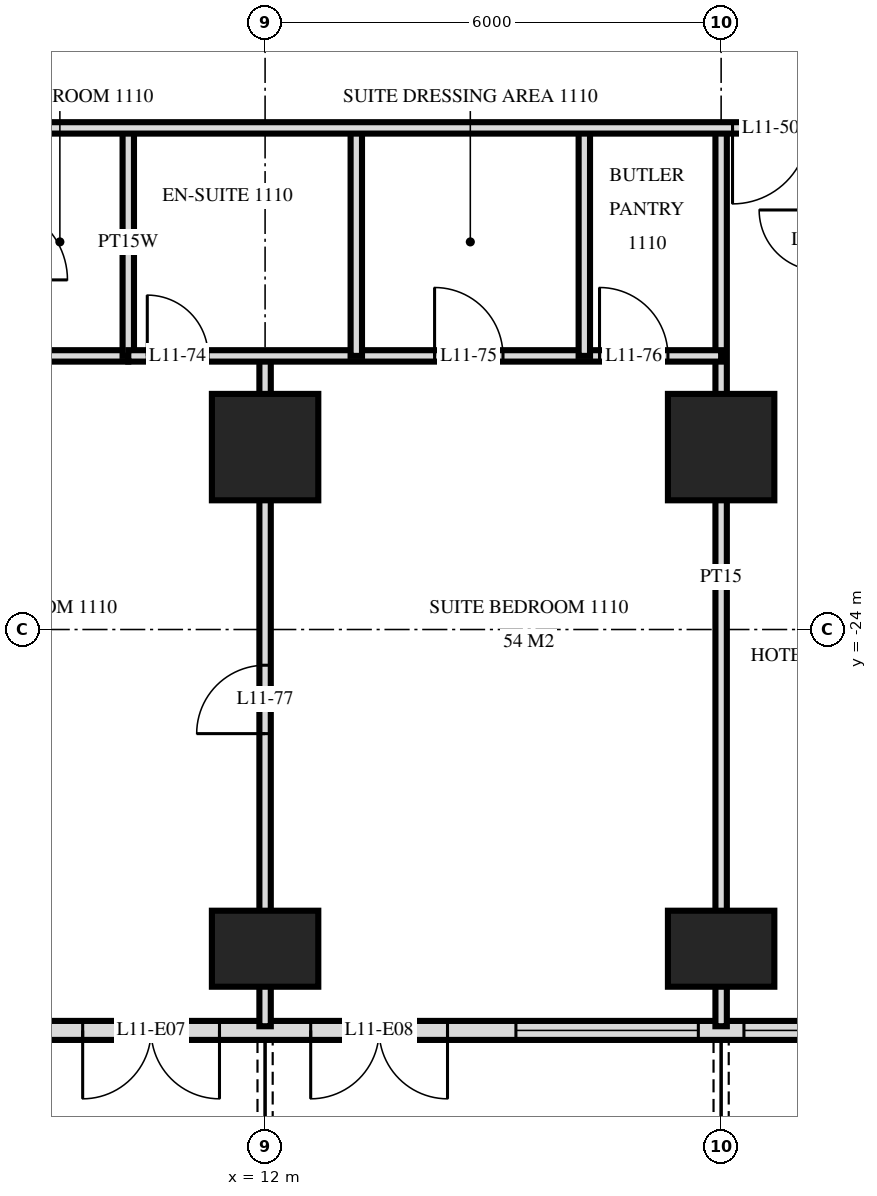
"""IFC4 building model, lengths in metres.
Left out: names, types, materials, properties, quantities, classifications, styles, units other than length and angle.
Written with IfcOpenShell. Run it as: python <this file> out.ifc"""

import sys

from ifc_helpers import new_model, si_unit, direction, frame, frame_2d, origin, origin_2d, place, context, subcontext, project, spatial, rectangle, extrude, element, fill, save


model = new_model("IFC4")
c1 = context("Model", 3, precision=1e-05, world=origin(), true_north=direction((0.0, 1.0)))
c2 = subcontext(c1, "Body", "Model", "MODEL_VIEW")
j1 = project(units=[si_unit("LENGTHUNIT", "METRE"), si_unit("PLANEANGLEUNIT", "RADIAN")], contexts=[c1])
p1 = place(None, origin())
s1 = spatial("IfcSite", under=j1, at=p1, CompositionType="ELEMENT")
p2 = place(p1, origin())
s2 = spatial("IfcBuilding", under=s1, at=p2, CompositionType="ELEMENT")
p3 = place(p2, frame((0.0, 0.0, 49.2)))
s3 = spatial("IfcBuildingStorey", under=s2, at=p3, CompositionType="ELEMENT", Elevation=49.2)
p4 = place(p3, frame((12.0, -28.2, 0.0), z_axis=(0.0, 0.0, 1.0), x_axis=(1.0, 0.0, 0.0)))
e1 = element("IfcColumn", 1, at=p4, inside=s3, PredefinedType="COLUMN", context=c2, shape_type="SweptSolid", body=[
    extrude(rectangle(XDim=1.4, YDim=1.0, at=origin_2d()), origin(), (0.0, 0.0, 1.0), 3.6),
])
p5 = place(p3, frame((12.0, -21.6, 0.0), z_axis=(0.0, 0.0, 1.0), x_axis=(1.0, 0.0, 0.0)))
e2 = element("IfcColumn", 2, at=p5, inside=s3, PredefinedType="COLUMN", context=c2, shape_type="SweptSolid", body=[
    extrude(rectangle(XDim=1.4, YDim=1.4, at=origin_2d()), origin(), (0.0, 0.0, 1.0), 3.6),
])
p6 = place(p3, frame((18.0, -28.2, 0.0), z_axis=(0.0, 0.0, 1.0), x_axis=(1.0, 0.0, 0.0)))
e3 = element("IfcColumn", 3, at=p6, inside=s3, PredefinedType="COLUMN", context=c2, shape_type="SweptSolid", body=[
    extrude(rectangle(XDim=1.4, YDim=1.0, at=origin_2d()), origin(), (0.0, 0.0, 1.0), 3.6),
])
p7 = place(p3, frame((18.0, -21.6, 0.0), z_axis=(0.0, 0.0, 1.0), x_axis=(1.0, 0.0, 0.0)))
e4 = element("IfcColumn", 4, at=p7, inside=s3, PredefinedType="COLUMN", context=c2, shape_type="SweptSolid", body=[
    extrude(rectangle(XDim=1.4, YDim=1.4, at=origin_2d()), origin(), (0.0, 0.0, 1.0), 3.6),
])
p8 = place(p3, frame((-28.775, -29.275, 0.0), z_axis=(0.0, 0.0, 1.0), x_axis=(1.0, 0.0, 0.0)))
e5 = element("IfcWall", 5, at=p8, inside=s3, PredefinedType="SOLIDWALL", context=c2, shape_type="SweptSolid", body=[
    extrude(rectangle(XDim=57.551, YDim=0.25, at=frame_2d((28.775, 0.0))), origin(), (0.0, 0.0, 1.0), 3.32),
])
p9 = place(p8, frame((0.575, 0.0, 0.0)))
e6 = element("IfcOpeningElement", 6, at=p9, cuts=e5, PredefinedType="OPENING", context=c2, shape_type="SweptSolid", body=[
    extrude(rectangle(XDim=1.8, YDim=2.4, at=frame_2d((0.9, 1.2))), frame((0.0, 0.135, 0.0), z_axis=(0.0, -1.0, 0.0), x_axis=(1.0, 0.0, 0.0)), (0.0, 0.0, 1.0), 0.27),
])
p10 = place(p8, frame((5.375, 0.0, 0.0)))
e7 = element("IfcOpeningElement", 7, at=p10, cuts=e5, PredefinedType="OPENING", context=c2, shape_type="SweptSolid", body=[
    extrude(rectangle(XDim=1.8, YDim=2.4, at=frame_2d((0.9, 1.2))), frame((0.0, 0.135, 0.0), z_axis=(0.0, -1.0, 0.0), x_axis=(1.0, 0.0, 0.0)), (0.0, 0.0, 1.0), 0.27),
])
p11 = place(p8, frame((8.075, 0.0, 0.3)))
e8 = element("IfcOpeningElement", 8, at=p11, cuts=e5, PredefinedType="OPENING", context=c2, shape_type="SweptSolid", body=[
    extrude(rectangle(XDim=2.4, YDim=2.1, at=frame_2d((1.2, 1.05))), frame((0.0, 0.135, 0.0), z_axis=(0.0, -1.0, 0.0), x_axis=(1.0, 0.0, 0.0)), (0.0, 0.0, 1.0), 0.27),
])
p12 = place(p8, frame((11.375, 0.0, 0.0)))
e9 = element("IfcOpeningElement", 9, at=p12, cuts=e5, PredefinedType="OPENING", context=c2, shape_type="SweptSolid", body=[
    extrude(rectangle(XDim=1.8, YDim=2.4, at=frame_2d((0.9, 1.2))), frame((0.0, 0.135, 0.0), z_axis=(0.0, -1.0, 0.0), x_axis=(1.0, 0.0, 0.0)), (0.0, 0.0, 1.0), 0.27),
])
p13 = place(p8, frame((14.075, 0.0, 0.3)))
e10 = element("IfcOpeningElement", 10, at=p13, cuts=e5, PredefinedType="OPENING", context=c2, shape_type="SweptSolid", body=[
    extrude(rectangle(XDim=2.4, YDim=2.1, at=frame_2d((1.2, 1.05))), frame((0.0, 0.135, 0.0), z_axis=(0.0, -1.0, 0.0), x_axis=(1.0, 0.0, 0.0)), (0.0, 0.0, 1.0), 0.27),
])
p14 = place(p8, frame((17.375, 0.0, 0.0)))
e11 = element("IfcOpeningElement", 11, at=p14, cuts=e5, PredefinedType="OPENING", context=c2, shape_type="SweptSolid", body=[
    extrude(rectangle(XDim=1.8, YDim=2.4, at=frame_2d((0.9, 1.2))), frame((0.0, 0.135, 0.0), z_axis=(0.0, -1.0, 0.0), x_axis=(1.0, 0.0, 0.0)), (0.0, 0.0, 1.0), 0.27),
])
p15 = place(p8, frame((20.075, 0.0, 0.3)))
e12 = element("IfcOpeningElement", 12, at=p15, cuts=e5, PredefinedType="OPENING", context=c2, shape_type="SweptSolid", body=[
    extrude(rectangle(XDim=2.4, YDim=2.1, at=frame_2d((1.2, 1.05))), frame((0.0, 0.135, 0.0), z_axis=(0.0, -1.0, 0.0), x_axis=(1.0, 0.0, 0.0)), (0.0, 0.0, 1.0), 0.27),
])
p16 = place(p8, frame((23.075, 0.0, 0.3)))
e13 = element("IfcOpeningElement", 13, at=p16, cuts=e5, PredefinedType="OPENING", context=c2, shape_type="SweptSolid", body=[
    extrude(rectangle(XDim=2.4, YDim=2.1, at=frame_2d((1.2, 1.05))), frame((0.0, 0.135, 0.0), z_axis=(0.0, -1.0, 0.0), x_axis=(1.0, 0.0, 0.0)), (0.0, 0.0, 1.0), 0.27),
])
p17 = place(p8, frame((26.375, 0.0, 0.0)))
e14 = element("IfcOpeningElement", 14, at=p17, cuts=e5, PredefinedType="OPENING", context=c2, shape_type="SweptSolid", body=[
    extrude(rectangle(XDim=1.8, YDim=2.4, at=frame_2d((0.9, 1.2))), frame((0.0, 0.135, 0.0), z_axis=(0.0, -1.0, 0.0), x_axis=(1.0, 0.0, 0.0)), (0.0, 0.0, 1.0), 0.27),
])
p18 = place(p8, frame((29.375, 0.0, 0.0)))
e15 = element("IfcOpeningElement", 15, at=p18, cuts=e5, PredefinedType="OPENING", context=c2, shape_type="SweptSolid", body=[
    extrude(rectangle(XDim=1.8, YDim=2.4, at=frame_2d((0.9, 1.2))), frame((0.0, 0.135, 0.0), z_axis=(0.0, -1.0, 0.0), x_axis=(1.0, 0.0, 0.0)), (0.0, 0.0, 1.0), 0.27),
])
p19 = place(p8, frame((32.075, 0.0, 0.3)))
e16 = element("IfcOpeningElement", 16, at=p19, cuts=e5, PredefinedType="OPENING", context=c2, shape_type="SweptSolid", body=[
    extrude(rectangle(XDim=2.4, YDim=2.1, at=frame_2d((1.2, 1.05))), frame((0.0, 0.135, 0.0), z_axis=(0.0, -1.0, 0.0), x_axis=(1.0, 0.0, 0.0)), (0.0, 0.0, 1.0), 0.27),
])
p20 = place(p8, frame((35.075, 0.0, 0.3)))
e17 = element("IfcOpeningElement", 17, at=p20, cuts=e5, PredefinedType="OPENING", context=c2, shape_type="SweptSolid", body=[
    extrude(rectangle(XDim=2.4, YDim=2.1, at=frame_2d((1.2, 1.05))), frame((0.0, 0.135, 0.0), z_axis=(0.0, -1.0, 0.0), x_axis=(1.0, 0.0, 0.0)), (0.0, 0.0, 1.0), 0.27),
])
p21 = place(p8, frame((38.375, 0.0, 0.0)))
e18 = element("IfcOpeningElement", 18, at=p21, cuts=e5, PredefinedType="OPENING", context=c2, shape_type="SweptSolid", body=[
    extrude(rectangle(XDim=1.8, YDim=2.4, at=frame_2d((0.9, 1.2))), frame((0.0, 0.135, 0.0), z_axis=(0.0, -1.0, 0.0), x_axis=(1.0, 0.0, 0.0)), (0.0, 0.0, 1.0), 0.27),
])
p22 = place(p8, frame((41.375, 0.0, 0.0)))
e19 = element("IfcOpeningElement", 19, at=p22, cuts=e5, PredefinedType="OPENING", context=c2, shape_type="SweptSolid", body=[
    extrude(rectangle(XDim=1.8, YDim=2.4, at=frame_2d((0.9, 1.2))), frame((0.0, 0.135, 0.0), z_axis=(0.0, -1.0, 0.0), x_axis=(1.0, 0.0, 0.0)), (0.0, 0.0, 1.0), 0.27),
])
p23 = place(p8, frame((44.075, 0.0, 0.3)))
e20 = element("IfcOpeningElement", 20, at=p23, cuts=e5, PredefinedType="OPENING", context=c2, shape_type="SweptSolid", body=[
    extrude(rectangle(XDim=2.4, YDim=2.1, at=frame_2d((1.2, 1.05))), frame((0.0, 0.135, 0.0), z_axis=(0.0, -1.0, 0.0), x_axis=(1.0, 0.0, 0.0)), (0.0, 0.0, 1.0), 0.27),
])
p24 = place(p8, frame((47.075, 0.0, 0.3)))
e21 = element("IfcOpeningElement", 21, at=p24, cuts=e5, PredefinedType="OPENING", context=c2, shape_type="SweptSolid", body=[
    extrude(rectangle(XDim=2.4, YDim=2.1, at=frame_2d((1.2, 1.05))), frame((0.0, 0.135, 0.0), z_axis=(0.0, -1.0, 0.0), x_axis=(1.0, 0.0, 0.0)), (0.0, 0.0, 1.0), 0.27),
])
p25 = place(p8, frame((50.375, 0.0, 0.0)))
e22 = element("IfcOpeningElement", 22, at=p25, cuts=e5, PredefinedType="OPENING", context=c2, shape_type="SweptSolid", body=[
    extrude(rectangle(XDim=1.8, YDim=2.4, at=frame_2d((0.9, 1.2))), frame((0.0, 0.135, 0.0), z_axis=(0.0, -1.0, 0.0), x_axis=(1.0, 0.0, 0.0)), (0.0, 0.0, 1.0), 0.27),
])
p26 = place(p8, frame((53.375, 0.0, 0.0)))
e23 = element("IfcOpeningElement", 23, at=p26, cuts=e5, PredefinedType="OPENING", context=c2, shape_type="SweptSolid", body=[
    extrude(rectangle(XDim=1.8, YDim=2.4, at=frame_2d((0.9, 1.2))), frame((0.0, 0.135, 0.0), z_axis=(0.0, -1.0, 0.0), x_axis=(1.0, 0.0, 0.0)), (0.0, 0.0, 1.0), 0.27),
])
p27 = place(p3, frame((18.0, -29.22, 0.0), z_axis=(0.0, 0.0, 1.0), x_axis=(0.0, 1.0, 0.0)))
e24 = element("IfcWall", 24, at=p27, inside=s3, PredefinedType="PARTITIONING", context=c2, shape_type="SweptSolid", body=[
    extrude(rectangle(XDim=11.82, YDim=0.15, at=frame_2d((5.91, 0.0))), origin(), (0.0, 0.0, 1.0), 3.32),
])
for number, where, z_axis, x_axis in (
    (25, (16.2, -20.4, 0.0), (0.0, 0.0, 1.0), (0.0, 1.0, 0.0)),
    (26, (13.2, -20.4, 0.0), (0.0, 0.0, 1.0), (0.0, 1.0, 0.0)),
):
    element("IfcWall", number, at=place(p3, frame(where, z_axis=z_axis, x_axis=x_axis)), inside=s3, PredefinedType="PARTITIONING", context=c2, shape_type="SweptSolid", body=[
        extrude(rectangle(XDim=3.0, YDim=0.15, at=frame_2d((1.5, 0.0))), origin(), (0.0, 0.0, 1.0), 3.32),
    ])
p28 = place(p3, frame((12.0, -29.22, 0.0), z_axis=(0.0, 0.0, 1.0), x_axis=(0.0, 1.0, 0.0)))
e27 = element("IfcWall", 27, at=p28, inside=s3, PredefinedType="PARTITIONING", context=c2, shape_type="SweptSolid", body=[
    extrude(rectangle(XDim=8.82, YDim=0.15, at=frame_2d((4.41, 0.0))), origin(), (0.0, 0.0, 1.0), 3.32),
])
p29 = place(p28, frame((3.85, 0.0, 0.0)))
e28 = element("IfcOpeningElement", 28, at=p29, cuts=e27, PredefinedType="OPENING", context=c2, shape_type="SweptSolid", body=[
    extrude(rectangle(XDim=0.9, YDim=2.1, at=frame_2d((0.45, 1.05))), frame((0.0, 0.085, 0.0), z_axis=(0.0, -1.0, 0.0), x_axis=(1.0, 0.0, 0.0)), (0.0, 0.0, 1.0), 0.17),
])
p30 = place(p3, frame((10.2, -20.4, 0.0), z_axis=(0.0, 0.0, 1.0), x_axis=(0.0, 1.0, 0.0)))
e29 = element("IfcWall", 29, at=p30, inside=s3, PredefinedType="PLUMBINGWALL", context=c2, shape_type="SweptSolid", body=[
    extrude(rectangle(XDim=3.0, YDim=0.15, at=frame_2d((1.5, 0.0))), origin(), (0.0, 0.0, 1.0), 3.32),
])
p31 = place(p3, frame((10.2, -20.4, 0.0), z_axis=(0.0, 0.0, 1.0), x_axis=(1.0, 0.0, 0.0)))
e30 = element("IfcWall", 30, at=p31, inside=s3, PredefinedType="PARTITIONING", context=c2, shape_type="SweptSolid", body=[
    extrude(rectangle(XDim=7.8, YDim=0.15, at=frame_2d((3.9, 0.0))), origin(), (0.0, 0.0, 1.0), 3.32),
])
p32 = place(p31, frame((0.25, 0.0, 0.0)))
e31 = element("IfcOpeningElement", 31, at=p32, cuts=e30, PredefinedType="OPENING", context=c2, shape_type="SweptSolid", body=[
    extrude(rectangle(XDim=0.8, YDim=2.1, at=frame_2d((0.4, 1.05))), frame((0.0, 0.085, 0.0), z_axis=(0.0, -1.0, 0.0), x_axis=(1.0, 0.0, 0.0)), (0.0, 0.0, 1.0), 0.17),
])
p33 = place(p31, frame((4.03, 0.0, 0.0)))
e32 = element("IfcOpeningElement", 32, at=p33, cuts=e30, PredefinedType="OPENING", context=c2, shape_type="SweptSolid", body=[
    extrude(rectangle(XDim=0.9, YDim=2.1, at=frame_2d((0.45, 1.05))), frame((0.0, 0.085, 0.0), z_axis=(0.0, -1.0, 0.0), x_axis=(1.0, 0.0, 0.0)), (0.0, 0.0, 1.0), 0.17),
])
p34 = place(p31, frame((6.2, 0.0, 0.0)))
e33 = element("IfcOpeningElement", 33, at=p34, cuts=e30, PredefinedType="OPENING", context=c2, shape_type="SweptSolid", body=[
    extrude(rectangle(XDim=0.9, YDim=2.1, at=frame_2d((0.45, 1.05))), frame((0.0, 0.085, 0.0), z_axis=(0.0, -1.0, 0.0), x_axis=(1.0, 0.0, 0.0)), (0.0, 0.0, 1.0), 0.17),
])
p35 = place(p3, frame((8.4, -20.4, 0.0), z_axis=(0.0, 0.0, 1.0), x_axis=(1.0, 0.0, 0.0)))
e34 = element("IfcWall", 34, at=p35, inside=s3, PredefinedType="PLUMBINGWALL", context=c2, shape_type="SweptSolid", body=[
    extrude(rectangle(XDim=1.8, YDim=0.15, at=frame_2d((0.9, 0.0))), origin(), (0.0, 0.0, 1.0), 3.32),
])
p36 = place(p3, frame((-33.12, -17.4, 0.0), z_axis=(0.0, 0.0, 1.0), x_axis=(1.0, 0.0, 0.0)))
e35 = element("IfcWall", 35, at=p36, inside=s3, PredefinedType="PARTITIONING", context=c2, shape_type="SweptSolid", body=[
    extrude(rectangle(XDim=66.24, YDim=0.15, at=frame_2d((33.12, 0.0))), origin(), (0.0, 0.0, 1.0), 3.32),
])
p37 = place(p36, frame((9.27, 0.0, 0.0)))
e36 = element("IfcOpeningElement", 36, at=p37, cuts=e35, PredefinedType="OPENING", context=c2, shape_type="SweptSolid", body=[
    extrude(rectangle(XDim=1.0, YDim=2.1, at=frame_2d((0.5, 1.05))), frame((0.0, 0.085, 0.0), z_axis=(0.0, -1.0, 0.0), x_axis=(1.0, 0.0, 0.0)), (0.0, 0.0, 1.0), 0.17),
])
p38 = place(p36, frame((13.97, 0.0, 0.0)))
e37 = element("IfcOpeningElement", 37, at=p38, cuts=e35, PredefinedType="OPENING", context=c2, shape_type="SweptSolid", body=[
    extrude(rectangle(XDim=1.0, YDim=2.1, at=frame_2d((0.5, 1.05))), frame((0.0, 0.085, 0.0), z_axis=(0.0, -1.0, 0.0), x_axis=(1.0, 0.0, 0.0)), (0.0, 0.0, 1.0), 0.17),
])
p39 = place(p36, frame((15.27, 0.0, 0.0)))
e38 = element("IfcOpeningElement", 38, at=p39, cuts=e35, PredefinedType="OPENING", context=c2, shape_type="SweptSolid", body=[
    extrude(rectangle(XDim=1.0, YDim=2.1, at=frame_2d((0.5, 1.05))), frame((0.0, 0.085, 0.0), z_axis=(0.0, -1.0, 0.0), x_axis=(1.0, 0.0, 0.0)), (0.0, 0.0, 1.0), 0.17),
])
p40 = place(p36, frame((19.97, 0.0, 0.0)))
e39 = element("IfcOpeningElement", 39, at=p40, cuts=e35, PredefinedType="OPENING", context=c2, shape_type="SweptSolid", body=[
    extrude(rectangle(XDim=1.0, YDim=2.1, at=frame_2d((0.5, 1.05))), frame((0.0, 0.085, 0.0), z_axis=(0.0, -1.0, 0.0), x_axis=(1.0, 0.0, 0.0)), (0.0, 0.0, 1.0), 0.17),
])
p41 = place(p36, frame((22.27, 0.0, 0.0)))
e40 = element("IfcOpeningElement", 40, at=p41, cuts=e35, PredefinedType="OPENING", context=c2, shape_type="SweptSolid", body=[
    extrude(rectangle(XDim=1.0, YDim=2.1, at=frame_2d((0.5, 1.05))), frame((0.0, 0.085, 0.0), z_axis=(0.0, -1.0, 0.0), x_axis=(1.0, 0.0, 0.0)), (0.0, 0.0, 1.0), 0.17),
])
p42 = place(p36, frame((28.97, 0.0, 0.0)))
e41 = element("IfcOpeningElement", 41, at=p42, cuts=e35, PredefinedType="OPENING", context=c2, shape_type="SweptSolid", body=[
    extrude(rectangle(XDim=1.0, YDim=2.1, at=frame_2d((0.5, 1.05))), frame((0.0, 0.085, 0.0), z_axis=(0.0, -1.0, 0.0), x_axis=(1.0, 0.0, 0.0)), (0.0, 0.0, 1.0), 0.17),
])
p43 = place(p36, frame((30.27, 0.0, 0.0)))
e42 = element("IfcOpeningElement", 42, at=p43, cuts=e35, PredefinedType="OPENING", context=c2, shape_type="SweptSolid", body=[
    extrude(rectangle(XDim=1.0, YDim=2.1, at=frame_2d((0.5, 1.05))), frame((0.0, 0.085, 0.0), z_axis=(0.0, -1.0, 0.0), x_axis=(1.0, 0.0, 0.0)), (0.0, 0.0, 1.0), 0.17),
])
p44 = place(p36, frame((34.97, 0.0, 0.0)))
e43 = element("IfcOpeningElement", 43, at=p44, cuts=e35, PredefinedType="OPENING", context=c2, shape_type="SweptSolid", body=[
    extrude(rectangle(XDim=1.0, YDim=2.1, at=frame_2d((0.5, 1.05))), frame((0.0, 0.085, 0.0), z_axis=(0.0, -1.0, 0.0), x_axis=(1.0, 0.0, 0.0)), (0.0, 0.0, 1.0), 0.17),
])
p45 = place(p36, frame((36.27, 0.0, 0.0)))
e44 = element("IfcOpeningElement", 44, at=p45, cuts=e35, PredefinedType="OPENING", context=c2, shape_type="SweptSolid", body=[
    extrude(rectangle(XDim=1.0, YDim=2.1, at=frame_2d((0.5, 1.05))), frame((0.0, 0.085, 0.0), z_axis=(0.0, -1.0, 0.0), x_axis=(1.0, 0.0, 0.0)), (0.0, 0.0, 1.0), 0.17),
])
p46 = place(p36, frame((39.82, 0.0, 0.0)))
e45 = element("IfcOpeningElement", 45, at=p46, cuts=e35, PredefinedType="OPENING", context=c2, shape_type="SweptSolid", body=[
    extrude(rectangle(XDim=1.0, YDim=2.1, at=frame_2d((0.5, 1.05))), frame((0.0, 0.085, 0.0), z_axis=(0.0, -1.0, 0.0), x_axis=(1.0, 0.0, 0.0)), (0.0, 0.0, 1.0), 0.17),
])
p47 = place(p36, frame((51.27, 0.0, 0.0)))
e46 = element("IfcOpeningElement", 46, at=p47, cuts=e35, PredefinedType="OPENING", context=c2, shape_type="SweptSolid", body=[
    extrude(rectangle(XDim=1.0, YDim=2.1, at=frame_2d((0.5, 1.05))), frame((0.0, 0.085, 0.0), z_axis=(0.0, -1.0, 0.0), x_axis=(1.0, 0.0, 0.0)), (0.0, 0.0, 1.0), 0.17),
])
p48 = place(p36, frame((4.42, 0.0, 0.0)))
e47 = element("IfcOpeningElement", 47, at=p48, cuts=e35, PredefinedType="OPENING", context=c2, shape_type="SweptSolid", body=[
    extrude(rectangle(XDim=1.0, YDim=2.1, at=frame_2d((0.5, 1.05))), frame((0.0, 0.085, 0.0), z_axis=(0.0, -1.0, 0.0), x_axis=(1.0, 0.0, 0.0)), (0.0, 0.0, 1.0), 0.17),
])
p49 = place(p36, frame((54.82, 0.0, 0.0)))
e48 = element("IfcOpeningElement", 48, at=p49, cuts=e35, PredefinedType="OPENING", context=c2, shape_type="SweptSolid", body=[
    extrude(rectangle(XDim=1.0, YDim=2.1, at=frame_2d((0.5, 1.05))), frame((0.0, 0.085, 0.0), z_axis=(0.0, -1.0, 0.0), x_axis=(1.0, 0.0, 0.0)), (0.0, 0.0, 1.0), 0.17),
])
p50 = place(p21, frame((0.9, 0.0, 0.0), z_axis=(0.0, 0.0, 1.0), x_axis=(-1.0, 0.0, 0.0)))
e49 = element("IfcDoor", 49, at=p50, inside=s3, OperationType="DOUBLE_DOOR_SINGLE_SWING", PredefinedType="DOOR", context=c2, shape_type="SweptSolid", body=[
    extrude(rectangle(XDim=1.8, YDim=2.4, at=frame_2d((0.0, 1.2))), frame((0.0, -0.025, 0.0), z_axis=(0.0, 1.0, 0.0), x_axis=(-1.0, 0.0, 0.0)), (0.0, 0.0, 1.0), 0.05),
])
fill(e18, e49)
p51 = place(p22, frame((0.9, 0.0, 0.0), z_axis=(0.0, 0.0, 1.0), x_axis=(-1.0, 0.0, 0.0)))
e50 = element("IfcDoor", 50, at=p51, inside=s3, OperationType="DOUBLE_DOOR_SINGLE_SWING", PredefinedType="DOOR", context=c2, shape_type="SweptSolid", body=[
    extrude(rectangle(XDim=1.8, YDim=2.4, at=frame_2d((0.0, 1.2))), frame((0.0, -0.025, 0.0), z_axis=(0.0, 1.0, 0.0), x_axis=(-1.0, 0.0, 0.0)), (0.0, 0.0, 1.0), 0.05),
])
fill(e19, e50)
p52 = place(p23, origin())
e51 = element("IfcWindow", 51, at=p52, inside=s3, PartitioningType="SINGLE_PANEL", PredefinedType="WINDOW", context=c2, shape_type="SweptSolid", body=[
    extrude(rectangle(XDim=2.4, YDim=2.1, at=frame_2d((1.2, 1.05))), frame((0.0, 0.03, 0.0), z_axis=(0.0, -1.0, 0.0), x_axis=(1.0, 0.0, 0.0)), (0.0, 0.0, 1.0), 0.06),
])
fill(e20, e51)
p53 = place(p24, origin())
e52 = element("IfcWindow", 52, at=p53, inside=s3, PartitioningType="SINGLE_PANEL", PredefinedType="WINDOW", context=c2, shape_type="SweptSolid", body=[
    extrude(rectangle(XDim=2.4, YDim=2.1, at=frame_2d((1.2, 1.05))), frame((0.0, 0.03, 0.0), z_axis=(0.0, -1.0, 0.0), x_axis=(1.0, 0.0, 0.0)), (0.0, 0.0, 1.0), 0.06),
])
fill(e21, e52)
p54 = place(p47, frame((0.5, 0.0, 0.0), z_axis=(0.0, 0.0, 1.0), x_axis=(-1.0, 0.0, 0.0)))
e53 = element("IfcDoor", 53, at=p54, inside=s3, OperationType="SINGLE_SWING_LEFT", PredefinedType="DOOR", context=c2, shape_type="SweptSolid", body=[
    extrude(rectangle(XDim=1.0, YDim=2.1, at=frame_2d((0.0, 1.05))), frame((0.0, -0.025, 0.0), z_axis=(0.0, 1.0, 0.0), x_axis=(-1.0, 0.0, 0.0)), (0.0, 0.0, 1.0), 0.05),
])
fill(e46, e53)
p55 = place(p32, origin())
e54 = element("IfcDoor", 54, at=p55, inside=s3, OperationType="SINGLE_SWING_RIGHT", PredefinedType="DOOR", context=c2, shape_type="SweptSolid", body=[
    extrude(rectangle(XDim=0.8, YDim=2.1, at=frame_2d((0.4, 1.05))), frame((0.0, 0.025, 0.0), z_axis=(0.0, -1.0, 0.0), x_axis=(1.0, 0.0, 0.0)), (0.0, 0.0, 1.0), 0.05),
])
fill(e31, e54)
p56 = place(p33, origin())
e55 = element("IfcDoor", 55, at=p56, inside=s3, OperationType="SINGLE_SWING_RIGHT", PredefinedType="DOOR", context=c2, shape_type="SweptSolid", body=[
    extrude(rectangle(XDim=0.9, YDim=2.1, at=frame_2d((0.45, 1.05))), frame((0.0, 0.025, 0.0), z_axis=(0.0, -1.0, 0.0), x_axis=(1.0, 0.0, 0.0)), (0.0, 0.0, 1.0), 0.05),
])
fill(e32, e55)
p57 = place(p34, origin())
e56 = element("IfcDoor", 56, at=p57, inside=s3, OperationType="SINGLE_SWING_RIGHT", PredefinedType="DOOR", context=c2, shape_type="SweptSolid", body=[
    extrude(rectangle(XDim=0.9, YDim=2.1, at=frame_2d((0.45, 1.05))), frame((0.0, 0.025, 0.0), z_axis=(0.0, -1.0, 0.0), x_axis=(1.0, 0.0, 0.0)), (0.0, 0.0, 1.0), 0.05),
])
fill(e33, e56)
p58 = place(p29, origin())
e57 = element("IfcDoor", 57, at=p58, inside=s3, OperationType="SINGLE_SWING_RIGHT", PredefinedType="DOOR", context=c2, shape_type="SweptSolid", body=[
    extrude(rectangle(XDim=0.9, YDim=2.1, at=frame_2d((0.45, 1.05))), frame((0.0, 0.025, 0.0), z_axis=(0.0, -1.0, 0.0), x_axis=(1.0, 0.0, 0.0)), (0.0, 0.0, 1.0), 0.05),
])
fill(e28, e57)
save(model, sys.argv[1])
